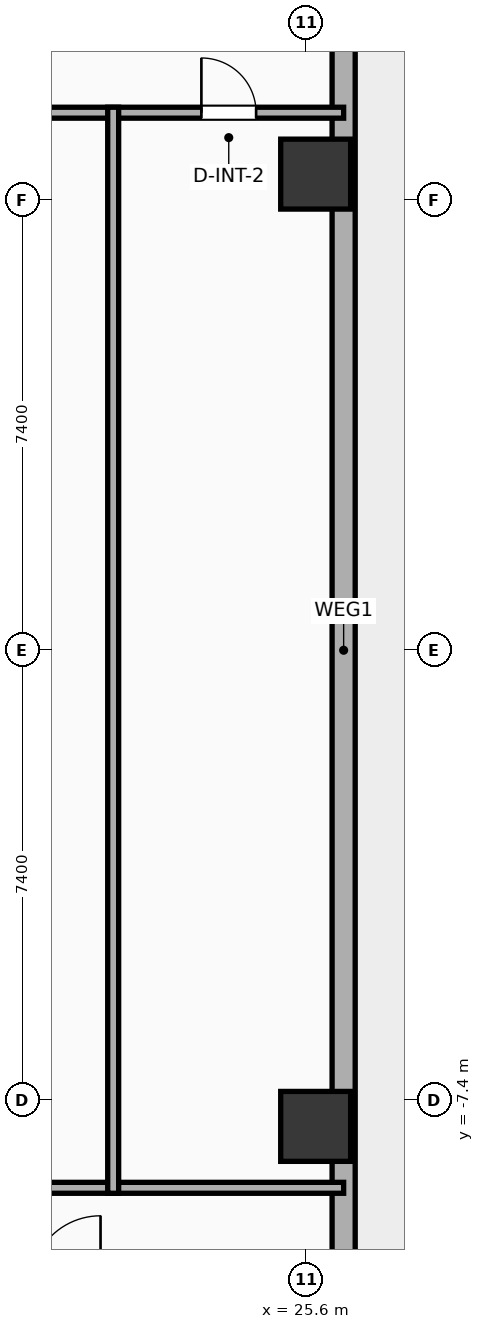
"""IFC4 building model, lengths in metres.
Left out: names, types, materials, properties, quantities, classifications, styles, units other than length and angle.
Written with IfcOpenShell. Run it as: python <this file> out.ifc"""

import sys

from ifc_helpers import new_model, si_unit, direction, frame, frame_2d, origin, origin_2d, place, context, subcontext, project, spatial, rectangle, hollow_rectangle, extrude, element, fill, save


model = new_model("IFC4")
c1 = context("Model", 3, precision=1e-05, world=origin(), true_north=direction((0.0, 1.0)))
c2 = subcontext(c1, "Body", "Model", "MODEL_VIEW")
j1 = project(units=[si_unit("LENGTHUNIT", "METRE"), si_unit("PLANEANGLEUNIT", "RADIAN")], contexts=[c1])
p1 = place(None, origin())
s1 = spatial("IfcSite", under=j1, at=p1, CompositionType="ELEMENT")
p2 = place(p1, origin())
s2 = spatial("IfcBuilding", under=s1, at=p2, CompositionType="ELEMENT")
p3 = place(p2, frame((0.0, 0.0, 26.0)))
s3 = spatial("IfcBuildingStorey", under=s2, at=p3, CompositionType="ELEMENT", Elevation=26.0)
for number, where, z_axis, x_axis in (
    (1, (25.75, -7.83, -0.25), (0.0, 0.0, 1.0), (1.0, 0.0, 0.0)),
    (2, (25.75, 7.83, -0.25), (0.0, 0.0, 1.0), (1.0, 0.0, 0.0)),
):
    element("IfcColumn", number, at=place(p3, frame(where, z_axis=z_axis, x_axis=x_axis)), inside=s3, PredefinedType="COLUMN", context=c2, shape_type="SweptSolid", body=[
        extrude(hollow_rectangle(XDim=1.15, YDim=1.15, WallThickness=0.04, at=origin_2d()), origin(), (0.0, 0.0, 1.0), 4.15),
    ])
p4 = place(p3, frame((26.21, 18.381, 0.0), z_axis=(0.0, 0.0, 1.0), x_axis=(0.0, -1.0, 0.0)))
e3 = element("IfcWall", 3, at=p4, inside=s3, PredefinedType="ELEMENTEDWALL", context=c2, shape_type="SweptSolid", body=[
    extrude(rectangle(XDim=36.763, YDim=0.38, at=frame_2d((18.381, 0.0))), origin(), (0.0, 0.0, 1.0), 2.54),
])
p5 = place(p4, frame((33.362, 0.0, 0.75)))
e4 = element("IfcOpeningElement", 4, at=p5, cuts=e3, PredefinedType="OPENING", context=c2, shape_type="SweptSolid", body=[
    extrude(rectangle(XDim=1.2, YDim=1.63, at=frame_2d((0.6, 0.815))), frame((0.0, 0.2, 0.0), z_axis=(0.0, -1.0, 0.0), x_axis=(1.0, 0.0, 0.0)), (0.0, 0.0, 1.0), 0.4),
])
p6 = place(p3, frame((9.88, 8.84, 0.0), z_axis=(0.0, 0.0, 1.0), x_axis=(1.0, 0.0, 0.0)))
e5 = element("IfcWall", 5, at=p6, inside=s3, PredefinedType="PARTITIONING", context=c2, shape_type="SweptSolid", body=[
    extrude(rectangle(XDim=16.33, YDim=0.18, at=frame_2d((8.165, 0.0))), origin(), (0.0, 0.0, 1.0), 3.65),
])
p7 = place(p6, frame((13.99, 0.0, 0.0)))
e6 = element("IfcOpeningElement", 6, at=p7, cuts=e5, PredefinedType="OPENING", context=c2, shape_type="SweptSolid", body=[
    extrude(rectangle(XDim=0.9, YDim=2.05, at=frame_2d((0.45, 1.025))), frame((0.0, 0.1, 0.0), z_axis=(0.0, -1.0, 0.0), x_axis=(1.0, 0.0, 0.0)), (0.0, 0.0, 1.0), 0.2),
])
p8 = place(p3, frame((9.88, -8.84, 0.0), z_axis=(0.0, 0.0, 1.0), x_axis=(1.0, 0.0, 0.0)))
e7 = element("IfcWall", 7, at=p8, inside=s3, PredefinedType="PARTITIONING", context=c2, shape_type="SweptSolid", body=[
    extrude(rectangle(XDim=16.33, YDim=0.18, at=frame_2d((8.165, 0.0))), origin(), (0.0, 0.0, 1.0), 3.65),
])
p9 = place(p3, frame((22.42, -8.93, 0.0), z_axis=(0.0, 0.0, 1.0), x_axis=(0.0, 1.0, 0.0)))
e8 = element("IfcWall", 8, at=p9, inside=s3, PredefinedType="PARTITIONING", context=c2, shape_type="SweptSolid", body=[
    extrude(rectangle(XDim=17.86, YDim=0.18, at=frame_2d((8.93, 0.0))), origin(), (0.0, 0.0, 1.0), 3.65),
])
p10 = place(p7, origin())
e9 = element("IfcDoor", 9, at=p10, inside=s3, OperationType="SINGLE_SWING_LEFT", PredefinedType="DOOR", context=c2, shape_type="SweptSolid", body=[
    extrude(rectangle(XDim=0.9, YDim=2.05, at=frame_2d((0.45, 1.025))), frame((0.0, 0.025, 0.0), z_axis=(0.0, -1.0, 0.0), x_axis=(1.0, 0.0, 0.0)), (0.0, 0.0, 1.0), 0.05),
])
fill(e6, e9)
save(model, sys.argv[1])
